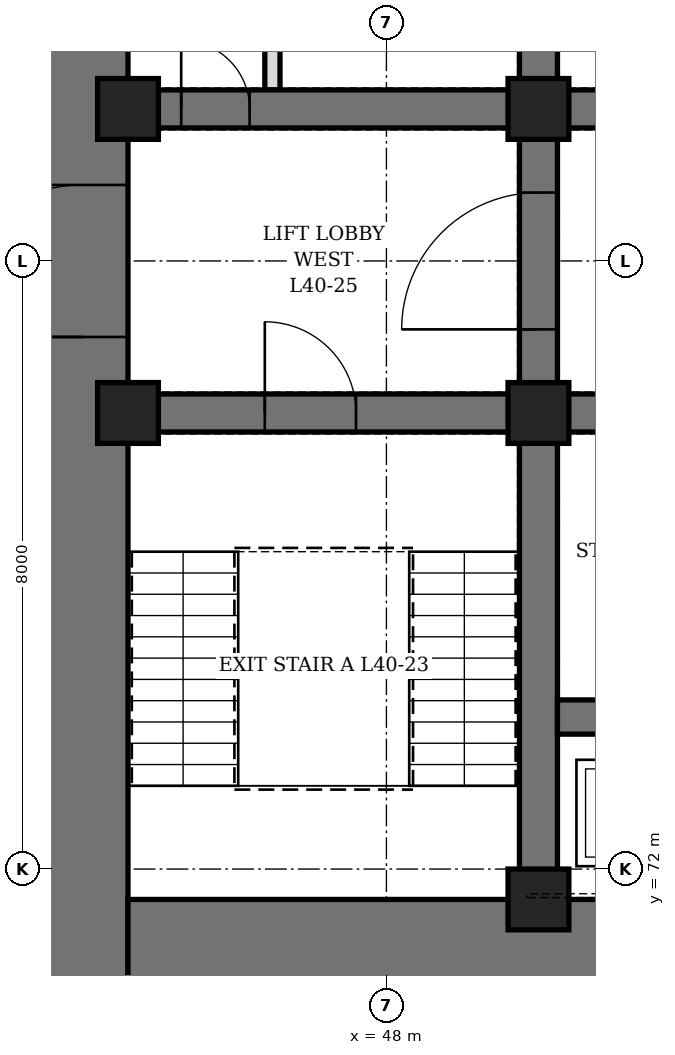
"""IFC4 building model, lengths in metres.
Left out: names, types, materials, properties, quantities, classifications, styles, units other than length and angle.
Written with IfcOpenShell. Run it as: python <this file> out.ifc"""

import sys

from ifc_helpers import new_model, si_unit, direction, frame, frame_2d, origin, origin_2d, place, context, subcontext, project, spatial, rectangle, hollow_rectangle, extrude, element, fill, save


model = new_model("IFC4")
c1 = context("Model", 3, precision=1e-05, world=origin(), true_north=direction((0.0, 1.0)))
c2 = subcontext(c1, "Body", "Model", "MODEL_VIEW")
j1 = project(units=[si_unit("LENGTHUNIT", "METRE"), si_unit("PLANEANGLEUNIT", "RADIAN")], contexts=[c1])
p1 = place(None, origin())
s1 = spatial("IfcSite", under=j1, at=p1, CompositionType="ELEMENT")
p2 = place(p1, origin())
s2 = spatial("IfcBuilding", under=s1, at=p2, CompositionType="ELEMENT")
p3 = place(p2, frame((0.0, 0.0, 181.3)))
s3 = spatial("IfcBuildingStorey", under=s2, at=p3, CompositionType="ELEMENT", Elevation=181.3)
p4 = place(p3, frame((44.0, 70.4, 0.0), z_axis=(0.0, 0.0, 1.0), x_axis=(0.0, 1.0, 0.0)))
e1 = element("IfcWall", 1, at=p4, inside=s3, PredefinedType="SHEAR", context=c2, shape_type="SweptSolid", body=[
    extrude(rectangle(XDim=19.2, YDim=1.2, at=frame_2d((9.6, 0.0))), origin(), (0.0, 0.0, 1.0), 4.2),
])
p5 = place(p4, frame((8.6, 0.0, 0.0)))
e2 = element("IfcOpeningElement", 2, at=p5, cuts=e1, PredefinedType="OPENING", context=c2, shape_type="SweptSolid", body=[
    extrude(rectangle(XDim=2.0, YDim=2.4, at=frame_2d((1.0, 1.2))), frame((0.0, 0.61, 0.0), z_axis=(0.0, -1.0, 0.0), x_axis=(1.0, 0.0, 0.0)), (0.0, 0.0, 1.0), 1.22),
])
p6 = place(p3, frame((44.6, 71.0, 0.0), z_axis=(0.0, 0.0, 1.0), x_axis=(1.0, 0.0, 0.0)))
e3 = element("IfcWall", 3, at=p6, inside=s3, PredefinedType="SHEAR", context=c2, shape_type="SweptSolid", body=[
    extrude(rectangle(XDim=22.8, YDim=1.2, at=frame_2d((11.4, 0.0))), origin(), (0.0, 0.0, 1.0), 4.2),
])
p7 = place(p6, frame((6.35, 0.0, 0.0)))
e4 = element("IfcOpeningElement", 4, at=p7, cuts=e3, PredefinedType="OPENING", context=c2, shape_type="SweptSolid", body=[
    extrude(rectangle(XDim=1.1, YDim=2.2, at=frame_2d((0.55, 1.1))), frame((0.0, 0.61, 0.0), z_axis=(0.0, -1.0, 0.0), x_axis=(1.0, 0.0, 0.0)), (0.0, 0.0, 1.0), 1.22),
])
p8 = place(p6, frame((9.35, 0.0, 0.0)))
e5 = element("IfcOpeningElement", 5, at=p8, cuts=e3, PredefinedType="OPENING", context=c2, shape_type="SweptSolid", body=[
    extrude(rectangle(XDim=1.1, YDim=2.2, at=frame_2d((0.55, 1.1))), frame((0.0, 0.61, 0.0), z_axis=(0.0, -1.0, 0.0), x_axis=(1.0, 0.0, 0.0)), (0.0, 0.0, 1.0), 1.22),
])
p9 = place(p6, frame((12.35, 0.0, 0.0)))
e6 = element("IfcOpeningElement", 6, at=p9, cuts=e3, PredefinedType="OPENING", context=c2, shape_type="SweptSolid", body=[
    extrude(rectangle(XDim=1.1, YDim=2.2, at=frame_2d((0.55, 1.1))), frame((0.0, 0.61, 0.0), z_axis=(0.0, -1.0, 0.0), x_axis=(1.0, 0.0, 0.0)), (0.0, 0.0, 1.0), 1.22),
])
p10 = place(p6, frame((15.35, 0.0, 0.0)))
e7 = element("IfcOpeningElement", 7, at=p10, cuts=e3, PredefinedType="OPENING", context=c2, shape_type="SweptSolid", body=[
    extrude(rectangle(XDim=1.1, YDim=2.2, at=frame_2d((0.55, 1.1))), frame((0.0, 0.61, 0.0), z_axis=(0.0, -1.0, 0.0), x_axis=(1.0, 0.0, 0.0)), (0.0, 0.0, 1.0), 1.22),
])
p11 = place(p3, frame((50.0, 71.6, 0.0), z_axis=(0.0, 0.0, 1.0), x_axis=(0.0, 1.0, 0.0)))
e8 = element("IfcWall", 8, at=p11, inside=s3, PredefinedType="SHEAR", context=c2, shape_type="SweptSolid", body=[
    extrude(rectangle(XDim=16.8, YDim=0.5, at=frame_2d((8.4, 0.0))), origin(), (0.0, 0.0, 1.0), 4.2),
])
p12 = place(p11, frame((7.5, 0.0, 0.0)))
e9 = element("IfcOpeningElement", 9, at=p12, cuts=e8, PredefinedType="OPENING", context=c2, shape_type="SweptSolid", body=[
    extrude(rectangle(XDim=1.8, YDim=2.4, at=frame_2d((0.9, 1.2))), frame((0.0, 0.26, 0.0), z_axis=(0.0, -1.0, 0.0), x_axis=(1.0, 0.0, 0.0)), (0.0, 0.0, 1.0), 0.52),
])
p13 = place(p3, frame((44.6, 78.0, 0.0), z_axis=(0.0, 0.0, 1.0), x_axis=(1.0, 0.0, 0.0)))
e10 = element("IfcWall", 10, at=p13, inside=s3, PredefinedType="SHEAR", context=c2, shape_type="SweptSolid", body=[
    extrude(rectangle(XDim=5.15, YDim=0.5, at=frame_2d((2.575, 0.0))), origin(), (0.0, 0.0, 1.0), 4.2),
])
p14 = place(p13, frame((1.8, 0.0, 0.0)))
e11 = element("IfcOpeningElement", 11, at=p14, cuts=e10, PredefinedType="OPENING", context=c2, shape_type="SweptSolid", body=[
    extrude(rectangle(XDim=1.2, YDim=2.1, at=frame_2d((0.6, 1.05))), frame((0.0, 0.26, 0.0), z_axis=(0.0, -1.0, 0.0), x_axis=(1.0, 0.0, 0.0)), (0.0, 0.0, 1.0), 0.52),
])
p15 = place(p3, frame((44.6, 82.0, 0.0), z_axis=(0.0, 0.0, 1.0), x_axis=(1.0, 0.0, 0.0)))
e12 = element("IfcWall", 12, at=p15, inside=s3, PredefinedType="SHEAR", context=c2, shape_type="SweptSolid", body=[
    extrude(rectangle(XDim=5.15, YDim=0.5, at=frame_2d((2.575, 0.0))), origin(), (0.0, 0.0, 1.0), 4.2),
])
p16 = place(p15, frame((0.7, 0.0, 0.0)))
e13 = element("IfcOpeningElement", 13, at=p16, cuts=e12, PredefinedType="OPENING", context=c2, shape_type="SweptSolid", body=[
    extrude(rectangle(XDim=0.9, YDim=2.1, at=frame_2d((0.45, 1.05))), frame((0.0, 0.26, 0.0), z_axis=(0.0, -1.0, 0.0), x_axis=(1.0, 0.0, 0.0)), (0.0, 0.0, 1.0), 0.52),
])
p17 = place(p3, frame((50.25, 78.0, 0.0), z_axis=(0.0, 0.0, 1.0), x_axis=(1.0, 0.0, 0.0)))
e14 = element("IfcWall", 14, at=p17, inside=s3, PredefinedType="SHEAR", context=c2, shape_type="SweptSolid", body=[
    extrude(rectangle(XDim=11.5, YDim=0.5, at=frame_2d((5.75, 0.0))), origin(), (0.0, 0.0, 1.0), 4.2),
])
p18 = place(p17, frame((0.8, 0.0, 0.0)))
e15 = element("IfcOpeningElement", 15, at=p18, cuts=e14, PredefinedType="OPENING", context=c2, shape_type="SweptSolid", body=[
    extrude(rectangle(XDim=0.9, YDim=2.1, at=frame_2d((0.45, 1.05))), frame((0.0, 0.26, 0.0), z_axis=(0.0, -1.0, 0.0), x_axis=(1.0, 0.0, 0.0)), (0.0, 0.0, 1.0), 0.52),
])
p19 = place(p17, frame((3.8, 0.0, 0.0)))
e16 = element("IfcOpeningElement", 16, at=p19, cuts=e14, PredefinedType="OPENING", context=c2, shape_type="SweptSolid", body=[
    extrude(rectangle(XDim=0.9, YDim=2.1, at=frame_2d((0.45, 1.05))), frame((0.0, 0.26, 0.0), z_axis=(0.0, -1.0, 0.0), x_axis=(1.0, 0.0, 0.0)), (0.0, 0.0, 1.0), 0.52),
])
p20 = place(p17, frame((6.8, 0.0, 0.0)))
e17 = element("IfcOpeningElement", 17, at=p20, cuts=e14, PredefinedType="OPENING", context=c2, shape_type="SweptSolid", body=[
    extrude(rectangle(XDim=0.9, YDim=2.1, at=frame_2d((0.45, 1.05))), frame((0.0, 0.26, 0.0), z_axis=(0.0, -1.0, 0.0), x_axis=(1.0, 0.0, 0.0)), (0.0, 0.0, 1.0), 0.52),
])
p21 = place(p17, frame((9.8, 0.0, 0.0)))
e18 = element("IfcOpeningElement", 18, at=p21, cuts=e14, PredefinedType="OPENING", context=c2, shape_type="SweptSolid", body=[
    extrude(rectangle(XDim=0.9, YDim=2.1, at=frame_2d((0.45, 1.05))), frame((0.0, 0.26, 0.0), z_axis=(0.0, -1.0, 0.0), x_axis=(1.0, 0.0, 0.0)), (0.0, 0.0, 1.0), 0.52),
])
p22 = place(p3, frame((50.25, 82.0, 0.0), z_axis=(0.0, 0.0, 1.0), x_axis=(1.0, 0.0, 0.0)))
e19 = element("IfcWall", 19, at=p22, inside=s3, PredefinedType="SHEAR", context=c2, shape_type="SweptSolid", body=[
    extrude(rectangle(XDim=11.5, YDim=0.5, at=frame_2d((5.75, 0.0))), origin(), (0.0, 0.0, 1.0), 4.2),
])
p23 = place(p22, frame((0.8, 0.0, 0.0)))
e20 = element("IfcOpeningElement", 20, at=p23, cuts=e19, PredefinedType="OPENING", context=c2, shape_type="SweptSolid", body=[
    extrude(rectangle(XDim=0.9, YDim=2.1, at=frame_2d((0.45, 1.05))), frame((0.0, 0.26, 0.0), z_axis=(0.0, -1.0, 0.0), x_axis=(1.0, 0.0, 0.0)), (0.0, 0.0, 1.0), 0.52),
])
p24 = place(p22, frame((3.8, 0.0, 0.0)))
e21 = element("IfcOpeningElement", 21, at=p24, cuts=e19, PredefinedType="OPENING", context=c2, shape_type="SweptSolid", body=[
    extrude(rectangle(XDim=0.9, YDim=2.1, at=frame_2d((0.45, 1.05))), frame((0.0, 0.26, 0.0), z_axis=(0.0, -1.0, 0.0), x_axis=(1.0, 0.0, 0.0)), (0.0, 0.0, 1.0), 0.52),
])
p25 = place(p22, frame((6.8, 0.0, 0.0)))
e22 = element("IfcOpeningElement", 22, at=p25, cuts=e19, PredefinedType="OPENING", context=c2, shape_type="SweptSolid", body=[
    extrude(rectangle(XDim=0.9, YDim=2.1, at=frame_2d((0.45, 1.05))), frame((0.0, 0.26, 0.0), z_axis=(0.0, -1.0, 0.0), x_axis=(1.0, 0.0, 0.0)), (0.0, 0.0, 1.0), 0.52),
])
p26 = place(p22, frame((9.8, 0.0, 0.0)))
e23 = element("IfcOpeningElement", 23, at=p26, cuts=e19, PredefinedType="OPENING", context=c2, shape_type="SweptSolid", body=[
    extrude(rectangle(XDim=0.9, YDim=2.1, at=frame_2d((0.45, 1.05))), frame((0.0, 0.26, 0.0), z_axis=(0.0, -1.0, 0.0), x_axis=(1.0, 0.0, 0.0)), (0.0, 0.0, 1.0), 0.52),
])
p27 = place(p3, frame((50.25, 74.0, 0.0), z_axis=(0.0, 0.0, 1.0), x_axis=(1.0, 0.0, 0.0)))
e24 = element("IfcWall", 24, at=p27, inside=s3, PredefinedType="SHEAR", context=c2, shape_type="SweptSolid", body=[
    extrude(rectangle(XDim=11.5, YDim=0.45, at=frame_2d((5.75, 0.0))), origin(), (0.0, 0.0, 1.0), 4.2),
])
for number, where, z_axis, x_axis in (
    (25, (44.6, 78.0, 0.0), (0.0, 0.0, 1.0), (1.0, 0.0, 0.0)),
    (26, (44.6, 82.0, 0.0), (0.0, 0.0, 1.0), (1.0, 0.0, 0.0)),
    (27, (50.0, 71.6, 0.0), (0.0, 0.0, 1.0), (1.0, 0.0, 0.0)),
    (28, (50.0, 78.0, 0.0), (0.0, 0.0, 1.0), (1.0, 0.0, 0.0)),
    (29, (50.0, 82.0, 0.0), (0.0, 0.0, 1.0), (1.0, 0.0, 0.0)),
):
    element("IfcColumn", number, at=place(p3, frame(where, z_axis=z_axis, x_axis=x_axis)), inside=s3, PredefinedType="COLUMN", context=c2, shape_type="SweptSolid", body=[
        extrude(hollow_rectangle(XDim=0.8, YDim=0.8, WallThickness=0.1, at=origin_2d()), origin(), (0.0, 0.0, 1.0), 4.2),
    ])
p28 = place(p3, frame((46.5, 82.25, 0.0), z_axis=(0.0, 0.0, 1.0), x_axis=(0.0, 1.0, 0.0)))
e30 = element("IfcWall", 30, at=p28, inside=s3, PredefinedType="PARTITIONING", context=c2, shape_type="SweptSolid", body=[
    extrude(rectangle(XDim=3.0, YDim=0.2, at=frame_2d((1.5, 0.0))), origin(), (0.0, 0.0, 1.0), 4.04),
])
p29 = place(p28, frame((1.05, 0.0, 0.0)))
e31 = element("IfcOpeningElement", 31, at=p29, cuts=e30, PredefinedType="OPENING", context=c2, shape_type="SweptSolid", body=[
    extrude(rectangle(XDim=0.9, YDim=2.1, at=frame_2d((0.45, 1.05))), frame((0.0, 0.11, 0.0), z_axis=(0.0, -1.0, 0.0), x_axis=(1.0, 0.0, 0.0)), (0.0, 0.0, 1.0), 0.22),
])
p30 = place(p16, origin())
e32 = element("IfcDoor", 32, at=p30, inside=s3, OperationType="SINGLE_SWING_LEFT", PredefinedType="DOOR", context=c2, shape_type="SweptSolid", body=[
    extrude(rectangle(XDim=0.9, YDim=2.1, at=frame_2d((0.45, 1.05))), frame((0.0, 0.25, 0.0), z_axis=(0.0, -1.0, 0.0), x_axis=(1.0, 0.0, 0.0)), (0.0, 0.0, 1.0), 0.5),
])
fill(e13, e32)
p31 = place(p14, origin())
e33 = element("IfcDoor", 33, at=p31, inside=s3, OperationType="SINGLE_SWING_LEFT", PredefinedType="DOOR", context=c2, shape_type="SweptSolid", body=[
    extrude(rectangle(XDim=1.2, YDim=2.1, at=frame_2d((0.6, 1.05))), frame((0.0, 0.25, 0.0), z_axis=(0.0, -1.0, 0.0), x_axis=(1.0, 0.0, 0.0)), (0.0, 0.0, 1.0), 0.5),
])
fill(e11, e33)
p32 = place(p5, origin())
e34 = element("IfcDoor", 34, at=p32, inside=s3, OperationType="DOUBLE_DOOR_SINGLE_SWING", PredefinedType="DOOR", context=c2, shape_type="SweptSolid", body=[
    extrude(rectangle(XDim=2.0, YDim=2.4, at=frame_2d((1.0, 1.2))), frame((0.0, 0.35, 0.0), z_axis=(0.0, -1.0, 0.0), x_axis=(1.0, 0.0, 0.0)), (0.0, 0.0, 1.0), 0.7),
])
fill(e2, e34)
p33 = place(p12, origin())
e35 = element("IfcDoor", 35, at=p33, inside=s3, OperationType="DOUBLE_DOOR_SINGLE_SWING", PredefinedType="DOOR", context=c2, shape_type="SweptSolid", body=[
    extrude(rectangle(XDim=1.8, YDim=2.4, at=frame_2d((0.9, 1.2))), frame((0.0, 0.25, 0.0), z_axis=(0.0, -1.0, 0.0), x_axis=(1.0, 0.0, 0.0)), (0.0, 0.0, 1.0), 0.5),
])
fill(e9, e35)
save(model, sys.argv[1])
